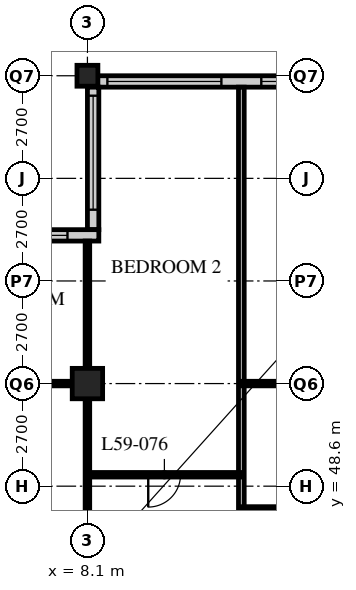
"""IFC4 building model, lengths in metres.
Left out: names, types, materials, properties, quantities, classifications, styles, units other than length and angle.
Written with IfcOpenShell. Run it as: python <this file> out.ifc"""

import sys

from ifc_helpers import new_model, si_unit, direction, frame, frame_2d, origin, origin_2d, place, context, subcontext, project, spatial, rectangle, hollow_rectangle, extrude, element, fill, save


model = new_model("IFC4")
c1 = context("Model", 3, precision=1e-05, world=origin(), true_north=direction((0.0, 1.0)))
c2 = subcontext(c1, "Body", "Model", "MODEL_VIEW")
j1 = project(units=[si_unit("LENGTHUNIT", "METRE"), si_unit("PLANEANGLEUNIT", "RADIAN")], contexts=[c1])
p1 = place(None, origin())
s1 = spatial("IfcSite", under=j1, at=p1, CompositionType="ELEMENT")
p2 = place(p1, origin())
s2 = spatial("IfcBuilding", under=s1, at=p2, CompositionType="ELEMENT")
p3 = place(p2, frame((0.0, 0.0, 228.0)))
s3 = spatial("IfcBuildingStorey", under=s2, at=p3, CompositionType="ELEMENT", Elevation=228.0)
p4 = place(p3, frame((8.1, 51.3, 0.0), z_axis=(0.0, 0.0, 1.0), x_axis=(1.0, 0.0, 0.0)))
e1 = element("IfcColumn", 1, at=p4, inside=s3, PredefinedType="COLUMN", context=c2, shape_type="SweptSolid", body=[
    extrude(hollow_rectangle(XDim=0.8, YDim=0.8, WallThickness=0.08, at=origin_2d()), origin(), (0.0, 0.0, 1.0), 3.6),
])
p5 = place(p3, frame((8.1, 59.4, 0.0), z_axis=(0.0, 0.0, 1.0), x_axis=(1.0, 0.0, 0.0)))
e2 = element("IfcColumn", 2, at=p5, inside=s3, PredefinedType="COLUMN", context=c2, shape_type="SweptSolid", body=[
    extrude(hollow_rectangle(XDim=0.55, YDim=0.55, WallThickness=0.045, at=origin_2d()), origin(), (0.0, 0.0, 1.0), 3.6),
])
p6 = place(p3, frame((48.3, 59.25, 0.0), z_axis=(0.0, 0.0, 1.0), x_axis=(-1.0, 0.0, 0.0)))
e3 = element("IfcWall", 3, at=p6, inside=s3, PredefinedType="SOLIDWALL", context=c2, shape_type="SweptSolid", body=[
    extrude(rectangle(XDim=40.2, YDim=0.3, at=frame_2d((20.1, 0.0))), origin(), (0.0, 0.0, 1.0), 3.39),
])
p7 = place(p6, frame((0.225, 0.0, 0.6)))
e4 = element("IfcOpeningElement", 4, at=p7, cuts=e3, PredefinedType="OPENING", context=c2, shape_type="SweptSolid", body=[
    extrude(rectangle(XDim=3.0, YDim=2.0, at=frame_2d((1.5, 1.0))), frame((0.0, 0.16, 0.0), z_axis=(0.0, -1.0, 0.0), x_axis=(1.0, 0.0, 0.0)), (0.0, 0.0, 1.0), 0.32),
])
p8 = place(p6, frame((4.275, 0.0, 0.6)))
e5 = element("IfcOpeningElement", 5, at=p8, cuts=e3, PredefinedType="OPENING", context=c2, shape_type="SweptSolid", body=[
    extrude(rectangle(XDim=3.0, YDim=2.0, at=frame_2d((1.5, 1.0))), frame((0.0, 0.16, 0.0), z_axis=(0.0, -1.0, 0.0), x_axis=(1.0, 0.0, 0.0)), (0.0, 0.0, 1.0), 0.32),
])
p9 = place(p6, frame((8.325, 0.0, 0.6)))
e6 = element("IfcOpeningElement", 6, at=p9, cuts=e3, PredefinedType="OPENING", context=c2, shape_type="SweptSolid", body=[
    extrude(rectangle(XDim=3.0, YDim=2.0, at=frame_2d((1.5, 1.0))), frame((0.0, 0.16, 0.0), z_axis=(0.0, -1.0, 0.0), x_axis=(1.0, 0.0, 0.0)), (0.0, 0.0, 1.0), 0.32),
])
p10 = place(p6, frame((12.375, 0.0, 0.6)))
e7 = element("IfcOpeningElement", 7, at=p10, cuts=e3, PredefinedType="OPENING", context=c2, shape_type="SweptSolid", body=[
    extrude(rectangle(XDim=3.0, YDim=2.0, at=frame_2d((1.5, 1.0))), frame((0.0, 0.16, 0.0), z_axis=(0.0, -1.0, 0.0), x_axis=(1.0, 0.0, 0.0)), (0.0, 0.0, 1.0), 0.32),
])
p11 = place(p6, frame((16.425, 0.0, 0.6)))
e8 = element("IfcOpeningElement", 8, at=p11, cuts=e3, PredefinedType="OPENING", context=c2, shape_type="SweptSolid", body=[
    extrude(rectangle(XDim=3.0, YDim=2.0, at=frame_2d((1.5, 1.0))), frame((0.0, 0.16, 0.0), z_axis=(0.0, -1.0, 0.0), x_axis=(1.0, 0.0, 0.0)), (0.0, 0.0, 1.0), 0.32),
])
p12 = place(p6, frame((20.475, 0.0, 0.6)))
e9 = element("IfcOpeningElement", 9, at=p12, cuts=e3, PredefinedType="OPENING", context=c2, shape_type="SweptSolid", body=[
    extrude(rectangle(XDim=3.0, YDim=2.0, at=frame_2d((1.5, 1.0))), frame((0.0, 0.16, 0.0), z_axis=(0.0, -1.0, 0.0), x_axis=(1.0, 0.0, 0.0)), (0.0, 0.0, 1.0), 0.32),
])
p13 = place(p6, frame((24.525, 0.0, 0.6)))
e10 = element("IfcOpeningElement", 10, at=p13, cuts=e3, PredefinedType="OPENING", context=c2, shape_type="SweptSolid", body=[
    extrude(rectangle(XDim=3.0, YDim=2.0, at=frame_2d((1.5, 1.0))), frame((0.0, 0.16, 0.0), z_axis=(0.0, -1.0, 0.0), x_axis=(1.0, 0.0, 0.0)), (0.0, 0.0, 1.0), 0.32),
])
p14 = place(p6, frame((28.575, 0.0, 0.6)))
e11 = element("IfcOpeningElement", 11, at=p14, cuts=e3, PredefinedType="OPENING", context=c2, shape_type="SweptSolid", body=[
    extrude(rectangle(XDim=3.0, YDim=2.0, at=frame_2d((1.5, 1.0))), frame((0.0, 0.16, 0.0), z_axis=(0.0, -1.0, 0.0), x_axis=(1.0, 0.0, 0.0)), (0.0, 0.0, 1.0), 0.32),
])
p15 = place(p6, frame((32.625, 0.0, 0.6)))
e12 = element("IfcOpeningElement", 12, at=p15, cuts=e3, PredefinedType="OPENING", context=c2, shape_type="SweptSolid", body=[
    extrude(rectangle(XDim=3.0, YDim=2.0, at=frame_2d((1.5, 1.0))), frame((0.0, 0.16, 0.0), z_axis=(0.0, -1.0, 0.0), x_axis=(1.0, 0.0, 0.0)), (0.0, 0.0, 1.0), 0.32),
])
p16 = place(p6, frame((36.675, 0.0, 0.6)))
e13 = element("IfcOpeningElement", 13, at=p16, cuts=e3, PredefinedType="OPENING", context=c2, shape_type="SweptSolid", body=[
    extrude(rectangle(XDim=3.0, YDim=2.0, at=frame_2d((1.5, 1.0))), frame((0.0, 0.16, 0.0), z_axis=(0.0, -1.0, 0.0), x_axis=(1.0, 0.0, 0.0)), (0.0, 0.0, 1.0), 0.32),
])
p17 = place(p3, frame((8.25, 59.1, 0.0), z_axis=(0.0, 0.0, 1.0), x_axis=(0.0, -1.0, 0.0)))
e14 = element("IfcWall", 14, at=p17, inside=s3, PredefinedType="SOLIDWALL", context=c2, shape_type="SweptSolid", body=[
    extrude(rectangle(XDim=3.75, YDim=0.3, at=frame_2d((1.875, 0.0))), origin(), (0.0, 0.0, 1.0), 3.39),
])
p18 = place(p17, frame((0.225, 0.0, 0.6)))
e15 = element("IfcOpeningElement", 15, at=p18, cuts=e14, PredefinedType="OPENING", context=c2, shape_type="SweptSolid", body=[
    extrude(rectangle(XDim=3.0, YDim=2.0, at=frame_2d((1.5, 1.0))), frame((0.0, 0.16, 0.0), z_axis=(0.0, -1.0, 0.0), x_axis=(1.0, 0.0, 0.0)), (0.0, 0.0, 1.0), 0.32),
])
p19 = place(p3, frame((8.4, 55.2, 0.0), z_axis=(0.0, 0.0, 1.0), x_axis=(-1.0, 0.0, 0.0)))
e16 = element("IfcWall", 16, at=p19, inside=s3, PredefinedType="SOLIDWALL", context=c2, shape_type="SweptSolid", body=[
    extrude(rectangle(XDim=4.35, YDim=0.3, at=frame_2d((2.175, 0.0))), origin(), (0.0, 0.0, 1.0), 3.39),
])
p20 = place(p19, frame((0.825, 0.0, 0.6)))
e17 = element("IfcOpeningElement", 17, at=p20, cuts=e16, PredefinedType="OPENING", context=c2, shape_type="SweptSolid", body=[
    extrude(rectangle(XDim=3.0, YDim=2.0, at=frame_2d((1.5, 1.0))), frame((0.0, 0.16, 0.0), z_axis=(0.0, -1.0, 0.0), x_axis=(1.0, 0.0, 0.0)), (0.0, 0.0, 1.0), 0.32),
])
p21 = place(p3, frame((8.1, 45.6, 0.0), z_axis=(0.0, 0.0, 1.0), x_axis=(0.0, 1.0, 0.0)))
e18 = element("IfcWall", 18, at=p21, inside=s3, PredefinedType="PARTITIONING", context=c2, shape_type="SweptSolid", body=[
    extrude(rectangle(XDim=9.45, YDim=0.12, at=frame_2d((4.725, 0.0))), origin(), (0.0, 0.0, 1.0), 2.628),
])
p22 = place(p3, frame((8.1, 51.3, 0.0), z_axis=(0.0, 0.0, 1.0), x_axis=(-1.0, 0.0, 0.0)))
e19 = element("IfcWall", 19, at=p22, inside=s3, PredefinedType="PARTITIONING", context=c2, shape_type="SweptSolid", body=[
    extrude(rectangle(XDim=3.75, YDim=0.12, at=frame_2d((1.875, 0.0))), origin(), (0.0, 0.0, 1.0), 2.628),
])
p23 = place(p22, frame((1.875, 0.0, 0.0)))
e20 = element("IfcOpeningElement", 20, at=p23, cuts=e19, PredefinedType="OPENING", context=c2, shape_type="SweptSolid", body=[
    extrude(rectangle(XDim=0.85, YDim=2.1, at=frame_2d((0.425, 1.05))), frame((0.0, 0.07, 0.0), z_axis=(0.0, -1.0, 0.0), x_axis=(1.0, 0.0, 0.0)), (0.0, 0.0, 1.0), 0.14),
])
p24 = place(p3, frame((12.15, 43.2, 0.0), z_axis=(0.0, 0.0, 1.0), x_axis=(0.0, 1.0, 0.0)))
e21 = element("IfcWall", 21, at=p24, inside=s3, PredefinedType="PARTITIONING", context=c2, shape_type="SweptSolid", body=[
    extrude(rectangle(XDim=15.9, YDim=0.15, at=frame_2d((7.95, 0.0))), origin(), (0.0, 0.0, 1.0), 3.39),
])
p25 = place(p3, frame((12.15, 48.0, 0.0), z_axis=(0.0, 0.0, 1.0), x_axis=(1.0, 0.0, 0.0)))
e22 = element("IfcWall", 22, at=p25, inside=s3, PredefinedType="PARTITIONING", context=c2, shape_type="SweptSolid", body=[
    extrude(rectangle(XDim=8.1, YDim=0.12, at=frame_2d((4.05, 0.0))), origin(), (0.0, 0.0, 1.0), 3.39),
])
p26 = place(p25, frame((3.625, 0.0, 0.0)))
e23 = element("IfcOpeningElement", 23, at=p26, cuts=e22, PredefinedType="OPENING", context=c2, shape_type="SweptSolid", body=[
    extrude(rectangle(XDim=0.85, YDim=2.1, at=frame_2d((0.425, 1.05))), frame((0.0, 0.07, 0.0), z_axis=(0.0, -1.0, 0.0), x_axis=(1.0, 0.0, 0.0)), (0.0, 0.0, 1.0), 0.14),
])
p27 = place(p3, frame((8.1, 48.9, 0.0), z_axis=(0.0, 0.0, 1.0), x_axis=(1.0, 0.0, 0.0)))
e24 = element("IfcWall", 24, at=p27, inside=s3, PredefinedType="PARTITIONING", context=c2, shape_type="SweptSolid", body=[
    extrude(rectangle(XDim=4.05, YDim=0.12, at=frame_2d((2.025, 0.0))), origin(), (0.0, 0.0, 1.0), 3.39),
])
p28 = place(p27, frame((1.6, 0.0, 0.0)))
e25 = element("IfcOpeningElement", 25, at=p28, cuts=e24, PredefinedType="OPENING", context=c2, shape_type="SweptSolid", body=[
    extrude(rectangle(XDim=0.85, YDim=2.1, at=frame_2d((0.425, 1.05))), frame((0.0, 0.07, 0.0), z_axis=(0.0, -1.0, 0.0), x_axis=(1.0, 0.0, 0.0)), (0.0, 0.0, 1.0), 0.14),
])
p29 = place(p3, frame((12.15, 51.3, 0.0), z_axis=(0.0, 0.0, 1.0), x_axis=(1.0, 0.0, 0.0)))
e26 = element("IfcWall", 26, at=p29, inside=s3, PredefinedType="PARTITIONING", context=c2, shape_type="SweptSolid", body=[
    extrude(rectangle(XDim=3.65, YDim=0.12, at=frame_2d((1.825, 0.0))), origin(), (0.0, 0.0, 1.0), 2.628),
])
p30 = place(p15, origin())
e27 = element("IfcWindow", 27, at=p30, inside=s3, PartitioningType="SINGLE_PANEL", PredefinedType="WINDOW", context=c2, shape_type="SweptSolid", body=[
    extrude(rectangle(XDim=3.0, YDim=2.0, at=frame_2d((1.5, 1.0))), frame((0.0, 0.03, 0.0), z_axis=(0.0, -1.0, 0.0), x_axis=(1.0, 0.0, 0.0)), (0.0, 0.0, 1.0), 0.06),
])
fill(e12, e27)
p31 = place(p16, origin())
e28 = element("IfcWindow", 28, at=p31, inside=s3, PartitioningType="SINGLE_PANEL", PredefinedType="WINDOW", context=c2, shape_type="SweptSolid", body=[
    extrude(rectangle(XDim=3.0, YDim=2.0, at=frame_2d((1.5, 1.0))), frame((0.0, 0.03, 0.0), z_axis=(0.0, -1.0, 0.0), x_axis=(1.0, 0.0, 0.0)), (0.0, 0.0, 1.0), 0.06),
])
fill(e13, e28)
p32 = place(p18, origin())
e29 = element("IfcWindow", 29, at=p32, inside=s3, PartitioningType="SINGLE_PANEL", PredefinedType="WINDOW", context=c2, shape_type="SweptSolid", body=[
    extrude(rectangle(XDim=3.0, YDim=2.0, at=frame_2d((1.5, 1.0))), frame((0.0, 0.03, 0.0), z_axis=(0.0, -1.0, 0.0), x_axis=(1.0, 0.0, 0.0)), (0.0, 0.0, 1.0), 0.06),
])
fill(e15, e29)
p33 = place(p20, origin())
e30 = element("IfcWindow", 30, at=p33, inside=s3, PartitioningType="SINGLE_PANEL", PredefinedType="WINDOW", context=c2, shape_type="SweptSolid", body=[
    extrude(rectangle(XDim=3.0, YDim=2.0, at=frame_2d((1.5, 1.0))), frame((0.0, 0.03, 0.0), z_axis=(0.0, -1.0, 0.0), x_axis=(1.0, 0.0, 0.0)), (0.0, 0.0, 1.0), 0.06),
])
fill(e17, e30)
p34 = place(p28, origin())
e31 = element("IfcDoor", 31, at=p34, inside=s3, OperationType="SINGLE_SWING_RIGHT", PredefinedType="DOOR", context=c2, shape_type="SweptSolid", body=[
    extrude(rectangle(XDim=0.85, YDim=2.1, at=frame_2d((0.425, 1.05))), frame((0.0, 0.025, 0.0), z_axis=(0.0, -1.0, 0.0), x_axis=(1.0, 0.0, 0.0)), (0.0, 0.0, 1.0), 0.05),
])
fill(e25, e31)
save(model, sys.argv[1])
